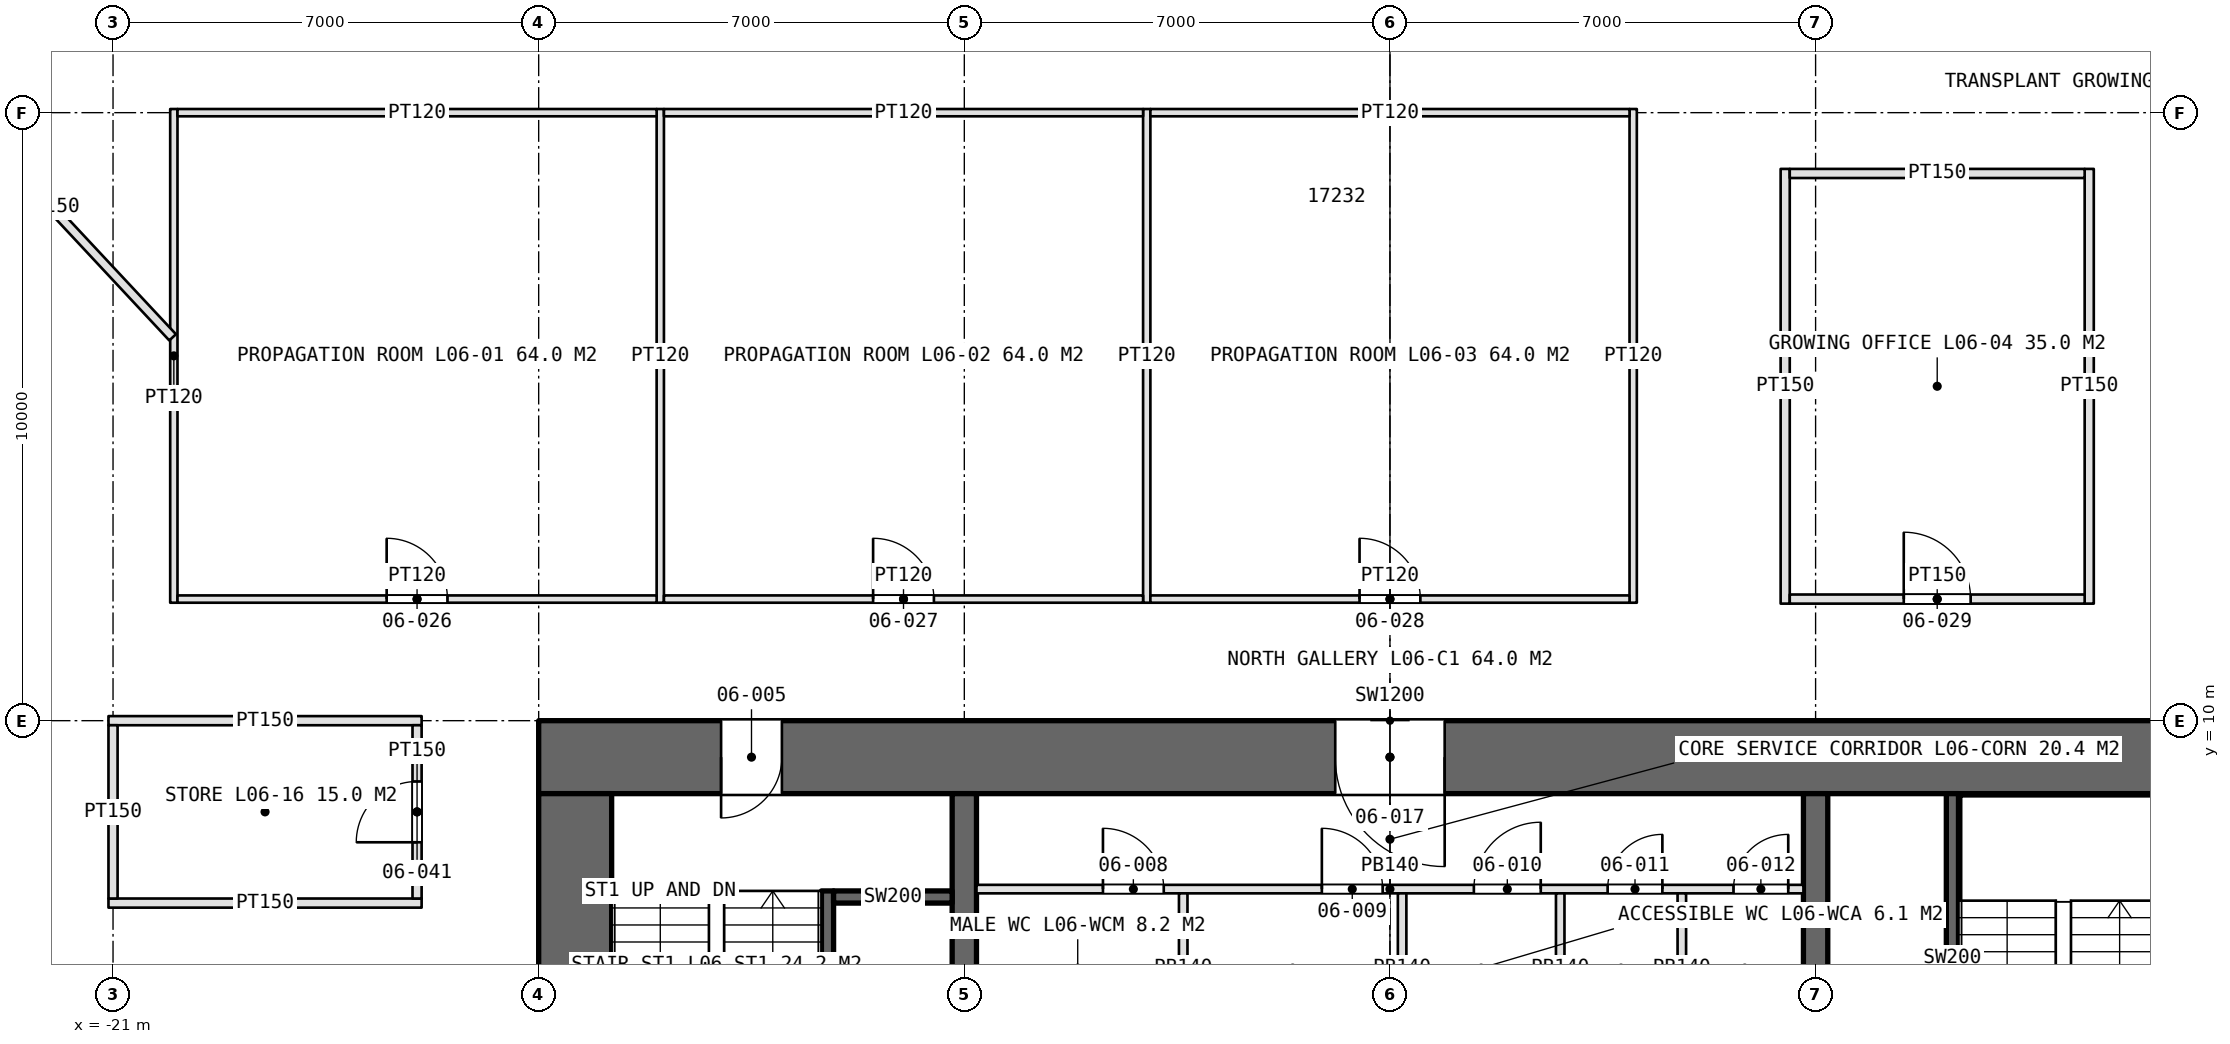
"""IFC4 building model, lengths in metres.
Left out: names, types, materials, properties, quantities, classifications, styles, units other than length and angle.
Written with IfcOpenShell. Run it as: python <this file> out.ifc"""

import sys

from ifc_helpers import new_model, si_unit, direction, frame, frame_2d, origin, place, context, subcontext, project, spatial, rectangle, extrude, element, fill, save


model = new_model("IFC4")
c1 = context("Model", 3, precision=1e-05, world=origin(), true_north=direction((0.0, 1.0)))
c2 = subcontext(c1, "Body", "Model", "MODEL_VIEW")
j1 = project(units=[si_unit("LENGTHUNIT", "METRE"), si_unit("PLANEANGLEUNIT", "RADIAN")], contexts=[c1])
p1 = place(None, origin())
s1 = spatial("IfcSite", under=j1, at=p1, CompositionType="ELEMENT")
p2 = place(p1, origin())
s2 = spatial("IfcBuilding", under=s1, at=p2, CompositionType="ELEMENT")
p3 = place(p2, frame((0.0, 0.0, 30.0)))
s3 = spatial("IfcBuildingStorey", under=s2, at=p3, CompositionType="ELEMENT", Elevation=30.0)
p4 = place(p3, frame((14.0, 9.4, 0.0), z_axis=(0.0, 0.0, 1.0), x_axis=(-1.0, 0.0, 0.0)))
e1 = element("IfcWall", 1, at=p4, inside=s3, PredefinedType="SHEAR", context=c2, shape_type="SweptSolid", body=[
    extrude(rectangle(XDim=28.0, YDim=1.2, at=frame_2d((14.0, 0.0))), origin(), (0.0, 0.0, 1.0), 5.0),
])
p5 = place(p4, frame((24.0, 0.0, 0.0)))
e2 = element("IfcOpeningElement", 2, at=p5, cuts=e1, PredefinedType="OPENING", context=c2, shape_type="SweptSolid", body=[
    extrude(rectangle(XDim=1.0, YDim=2.4, at=frame_2d((0.5, 1.2))), frame((0.0, 0.61, 0.0), z_axis=(0.0, -1.0, 0.0), x_axis=(1.0, 0.0, 0.0)), (0.0, 0.0, 1.0), 1.22),
])
p6 = place(p4, frame((13.1, 0.0, 0.0)))
e3 = element("IfcOpeningElement", 3, at=p6, cuts=e1, PredefinedType="OPENING", context=c2, shape_type="SweptSolid", body=[
    extrude(rectangle(XDim=1.8, YDim=2.4, at=frame_2d((0.9, 1.2))), frame((0.0, 0.61, 0.0), z_axis=(0.0, -1.0, 0.0), x_axis=(1.0, 0.0, 0.0)), (0.0, 0.0, 1.0), 1.22),
])
p7 = place(p3, frame((-13.4, 8.8, 0.0), z_axis=(0.0, 0.0, 1.0), x_axis=(0.0, -1.0, 0.0)))
e4 = element("IfcWall", 4, at=p7, inside=s3, PredefinedType="SHEAR", context=c2, shape_type="SweptSolid", body=[
    extrude(rectangle(XDim=17.6, YDim=1.2, at=frame_2d((8.8, 0.0))), origin(), (0.0, 0.0, 1.0), 5.0),
])
p8 = place(p7, frame((7.9, 0.0, 0.0)))
e5 = element("IfcOpeningElement", 5, at=p8, cuts=e4, PredefinedType="OPENING", context=c2, shape_type="SweptSolid", body=[
    extrude(rectangle(XDim=1.8, YDim=2.4, at=frame_2d((0.9, 1.2))), frame((0.0, 0.61, 0.0), z_axis=(0.0, -1.0, 0.0), x_axis=(1.0, 0.0, 0.0)), (0.0, 0.0, 1.0), 1.22),
])
p9 = place(p7, frame((16.5, 0.0, 0.0)))
e6 = element("IfcOpeningElement", 6, at=p9, cuts=e4, PredefinedType="OPENING", context=c2, shape_type="SweptSolid", body=[
    extrude(rectangle(XDim=1.0, YDim=2.4, at=frame_2d((0.5, 1.2))), frame((0.0, 0.61, 0.0), z_axis=(0.0, -1.0, 0.0), x_axis=(1.0, 0.0, 0.0)), (0.0, 0.0, 1.0), 1.22),
])
p10 = place(p3, frame((-7.0, -8.8, 0.0), z_axis=(0.0, 0.0, 1.0), x_axis=(0.0, 1.0, 0.0)))
e7 = element("IfcWall", 7, at=p10, inside=s3, PredefinedType="SHEAR", context=c2, shape_type="SweptSolid", body=[
    extrude(rectangle(XDim=17.6, YDim=0.4, at=frame_2d((8.8, 0.0))), origin(), (0.0, 0.0, 1.0), 5.0),
])
p11 = place(p10, frame((7.9, 0.0, 0.0)))
e8 = element("IfcOpeningElement", 8, at=p11, cuts=e7, PredefinedType="OPENING", context=c2, shape_type="SweptSolid", body=[
    extrude(rectangle(XDim=1.8, YDim=2.4, at=frame_2d((0.9, 1.2))), frame((0.0, 0.21, 0.0), z_axis=(0.0, -1.0, 0.0), x_axis=(1.0, 0.0, 0.0)), (0.0, 0.0, 1.0), 0.42),
])
p12 = place(p3, frame((7.0, -8.8, 0.0), z_axis=(0.0, 0.0, 1.0), x_axis=(0.0, 1.0, 0.0)))
e9 = element("IfcWall", 9, at=p12, inside=s3, PredefinedType="SHEAR", context=c2, shape_type="SweptSolid", body=[
    extrude(rectangle(XDim=17.6, YDim=0.4, at=frame_2d((8.8, 0.0))), origin(), (0.0, 0.0, 1.0), 5.0),
])
p13 = place(p12, frame((7.9, 0.0, 0.0)))
e10 = element("IfcOpeningElement", 10, at=p13, cuts=e9, PredefinedType="OPENING", context=c2, shape_type="SweptSolid", body=[
    extrude(rectangle(XDim=1.8, YDim=2.4, at=frame_2d((0.9, 1.2))), frame((0.0, 0.21, 0.0), z_axis=(0.0, -1.0, 0.0), x_axis=(1.0, 0.0, 0.0)), (0.0, 0.0, 1.0), 0.42),
])
p14 = place(p3, frame((-6.8, 7.23, 0.0), z_axis=(0.0, 0.0, 1.0), x_axis=(1.0, 0.0, 0.0)))
e11 = element("IfcWall", 11, at=p14, inside=s3, PredefinedType="PARTITIONING", context=c2, shape_type="SweptSolid", body=[
    extrude(rectangle(XDim=13.6, YDim=0.14, at=frame_2d((6.8, 0.0))), origin(), (0.0, 0.0, 1.0), 4.75),
])
p15 = place(p14, frame((2.08, 0.0, 0.0)))
e12 = element("IfcOpeningElement", 12, at=p15, cuts=e11, PredefinedType="OPENING", context=c2, shape_type="SweptSolid", body=[
    extrude(rectangle(XDim=1.0, YDim=2.4, at=frame_2d((0.5, 1.2))), frame((0.0, 0.08, 0.0), z_axis=(0.0, -1.0, 0.0), x_axis=(1.0, 0.0, 0.0)), (0.0, 0.0, 1.0), 0.16),
])
p16 = place(p14, frame((5.68, 0.0, 0.0)))
e13 = element("IfcOpeningElement", 13, at=p16, cuts=e11, PredefinedType="OPENING", context=c2, shape_type="SweptSolid", body=[
    extrude(rectangle(XDim=1.0, YDim=2.4, at=frame_2d((0.5, 1.2))), frame((0.0, 0.08, 0.0), z_axis=(0.0, -1.0, 0.0), x_axis=(1.0, 0.0, 0.0)), (0.0, 0.0, 1.0), 0.16),
])
p17 = place(p14, frame((8.18, 0.0, 0.0)))
e14 = element("IfcOpeningElement", 14, at=p17, cuts=e11, PredefinedType="OPENING", context=c2, shape_type="SweptSolid", body=[
    extrude(rectangle(XDim=1.1, YDim=2.4, at=frame_2d((0.55, 1.2))), frame((0.0, 0.08, 0.0), z_axis=(0.0, -1.0, 0.0), x_axis=(1.0, 0.0, 0.0)), (0.0, 0.0, 1.0), 0.16),
])
p18 = place(p14, frame((10.38, 0.0, 0.0)))
e15 = element("IfcOpeningElement", 15, at=p18, cuts=e11, PredefinedType="OPENING", context=c2, shape_type="SweptSolid", body=[
    extrude(rectangle(XDim=0.9, YDim=2.4, at=frame_2d((0.45, 1.2))), frame((0.0, 0.08, 0.0), z_axis=(0.0, -1.0, 0.0), x_axis=(1.0, 0.0, 0.0)), (0.0, 0.0, 1.0), 0.16),
])
p19 = place(p14, frame((12.45, 0.0, 0.0)))
e16 = element("IfcOpeningElement", 16, at=p19, cuts=e11, PredefinedType="OPENING", context=c2, shape_type="SweptSolid", body=[
    extrude(rectangle(XDim=0.9, YDim=2.4, at=frame_2d((0.45, 1.2))), frame((0.0, 0.08, 0.0), z_axis=(0.0, -1.0, 0.0), x_axis=(1.0, 0.0, 0.0)), (0.0, 0.0, 1.0), 0.16),
])
for number, where, z_axis, x_axis in (
    (17, (-3.4, 4.7, 0.0), (0.0, 0.0, 1.0), (0.0, 1.0, 0.0)),
    (18, (0.2, 4.7, 0.0), (0.0, 0.0, 1.0), (0.0, 1.0, 0.0)),
    (19, (2.8, 4.7, 0.0), (0.0, 0.0, 1.0), (0.0, 1.0, 0.0)),
    (20, (4.8, 4.7, 0.0), (0.0, 0.0, 1.0), (0.0, 1.0, 0.0)),
):
    element("IfcWall", number, at=place(p3, frame(where, z_axis=z_axis, x_axis=x_axis)), inside=s3, PredefinedType="PARTITIONING", context=c2, shape_type="SweptSolid", body=[
        extrude(rectangle(XDim=2.46, YDim=0.14, at=frame_2d((1.23, 0.0))), origin(), (0.0, 0.0, 1.0), 4.75),
    ])
p20 = place(p3, frame((-9.25, 7.2, 0.0), z_axis=(0.0, 0.0, 1.0), x_axis=(0.0, -1.0, 0.0)))
e21 = element("IfcWall", 21, at=p20, inside=s3, PredefinedType="SOLIDWALL", context=c2, shape_type="SweptSolid", body=[
    extrude(rectangle(XDim=5.4, YDim=0.2, at=frame_2d((2.7, 0.0))), origin(), (0.0, 0.0, 1.0), 5.0),
])
p21 = place(p3, frame((-9.15, 7.1, 0.0), z_axis=(0.0, 0.0, 1.0), x_axis=(1.0, 0.0, 0.0)))
e22 = element("IfcWall", 22, at=p21, inside=s3, PredefinedType="SOLIDWALL", context=c2, shape_type="SweptSolid", body=[
    extrude(rectangle(XDim=1.95, YDim=0.2, at=frame_2d((0.975, 0.0))), origin(), (0.0, 0.0, 1.0), 5.0),
])
p22 = place(p3, frame((9.25, 3.4, 0.0), z_axis=(0.0, 0.0, 1.0), x_axis=(0.0, 1.0, 0.0)))
e23 = element("IfcWall", 23, at=p22, inside=s3, PredefinedType="SOLIDWALL", context=c2, shape_type="SweptSolid", body=[
    extrude(rectangle(XDim=5.4, YDim=0.2, at=frame_2d((2.7, 0.0))), origin(), (0.0, 0.0, 1.0), 5.0),
])
for number, where, z_axis, x_axis in (
    (24, (-20.0, 11.94, 0.0), (0.0, 0.0, 1.0), (0.0, 1.0, 0.0)),
    (25, (-12.0, 11.94, 0.0), (0.0, 0.0, 1.0), (0.0, 1.0, 0.0)),
    (26, (-4.0, 11.94, 0.0), (0.0, 0.0, 1.0), (0.0, 1.0, 0.0)),
    (27, (4.0, 11.94, 0.0), (0.0, 0.0, 1.0), (0.0, 1.0, 0.0)),
):
    element("IfcWall", number, at=place(p3, frame(where, z_axis=z_axis, x_axis=x_axis)), inside=s3, PredefinedType="PARTITIONING", context=c2, shape_type="SweptSolid", body=[
        extrude(rectangle(XDim=8.12, YDim=0.12, at=frame_2d((4.06, 0.0))), origin(), (0.0, 0.0, 1.0), 3.6),
    ])
p23 = place(p3, frame((-19.94, 12.0, 0.0), z_axis=(0.0, 0.0, 1.0), x_axis=(1.0, 0.0, 0.0)))
e28 = element("IfcWall", 28, at=p23, inside=s3, PredefinedType="PARTITIONING", context=c2, shape_type="SweptSolid", body=[
    extrude(rectangle(XDim=7.88, YDim=0.12, at=frame_2d((3.94, 0.0))), origin(), (0.0, 0.0, 1.0), 3.6),
])
p24 = place(p23, frame((3.44, 0.0, 0.0)))
e29 = element("IfcOpeningElement", 29, at=p24, cuts=e28, PredefinedType="OPENING", context=c2, shape_type="SweptSolid", body=[
    extrude(rectangle(XDim=1.0, YDim=2.2, at=frame_2d((0.5, 1.1))), frame((0.0, 0.07, 0.0), z_axis=(0.0, -1.0, 0.0), x_axis=(1.0, 0.0, 0.0)), (0.0, 0.0, 1.0), 0.14),
])
p25 = place(p3, frame((-19.94, 20.0, 0.0), z_axis=(0.0, 0.0, 1.0), x_axis=(1.0, 0.0, 0.0)))
e30 = element("IfcWall", 30, at=p25, inside=s3, PredefinedType="PARTITIONING", context=c2, shape_type="SweptSolid", body=[
    extrude(rectangle(XDim=7.88, YDim=0.12, at=frame_2d((3.94, 0.0))), origin(), (0.0, 0.0, 1.0), 3.6),
])
p26 = place(p3, frame((-11.94, 12.0, 0.0), z_axis=(0.0, 0.0, 1.0), x_axis=(1.0, 0.0, 0.0)))
e31 = element("IfcWall", 31, at=p26, inside=s3, PredefinedType="PARTITIONING", context=c2, shape_type="SweptSolid", body=[
    extrude(rectangle(XDim=7.88, YDim=0.12, at=frame_2d((3.94, 0.0))), origin(), (0.0, 0.0, 1.0), 3.6),
])
p27 = place(p26, frame((3.44, 0.0, 0.0)))
e32 = element("IfcOpeningElement", 32, at=p27, cuts=e31, PredefinedType="OPENING", context=c2, shape_type="SweptSolid", body=[
    extrude(rectangle(XDim=1.0, YDim=2.2, at=frame_2d((0.5, 1.1))), frame((0.0, 0.07, 0.0), z_axis=(0.0, -1.0, 0.0), x_axis=(1.0, 0.0, 0.0)), (0.0, 0.0, 1.0), 0.14),
])
p28 = place(p3, frame((-11.94, 20.0, 0.0), z_axis=(0.0, 0.0, 1.0), x_axis=(1.0, 0.0, 0.0)))
e33 = element("IfcWall", 33, at=p28, inside=s3, PredefinedType="PARTITIONING", context=c2, shape_type="SweptSolid", body=[
    extrude(rectangle(XDim=7.88, YDim=0.12, at=frame_2d((3.94, 0.0))), origin(), (0.0, 0.0, 1.0), 3.6),
])
p29 = place(p3, frame((-3.94, 12.0, 0.0), z_axis=(0.0, 0.0, 1.0), x_axis=(1.0, 0.0, 0.0)))
e34 = element("IfcWall", 34, at=p29, inside=s3, PredefinedType="PARTITIONING", context=c2, shape_type="SweptSolid", body=[
    extrude(rectangle(XDim=7.88, YDim=0.12, at=frame_2d((3.94, 0.0))), origin(), (0.0, 0.0, 1.0), 3.6),
])
p30 = place(p29, frame((3.44, 0.0, 0.0)))
e35 = element("IfcOpeningElement", 35, at=p30, cuts=e34, PredefinedType="OPENING", context=c2, shape_type="SweptSolid", body=[
    extrude(rectangle(XDim=1.0, YDim=2.2, at=frame_2d((0.5, 1.1))), frame((0.0, 0.07, 0.0), z_axis=(0.0, -1.0, 0.0), x_axis=(1.0, 0.0, 0.0)), (0.0, 0.0, 1.0), 0.14),
])
p31 = place(p3, frame((-3.94, 20.0, 0.0), z_axis=(0.0, 0.0, 1.0), x_axis=(1.0, 0.0, 0.0)))
e36 = element("IfcWall", 36, at=p31, inside=s3, PredefinedType="PARTITIONING", context=c2, shape_type="SweptSolid", body=[
    extrude(rectangle(XDim=7.88, YDim=0.12, at=frame_2d((3.94, 0.0))), origin(), (0.0, 0.0, 1.0), 3.6),
])
for number, where, z_axis, x_axis in (
    (37, (6.5, 11.925, 0.0), (0.0, 0.0, 1.0), (0.0, 1.0, 0.0)),
    (38, (11.5, 11.925, 0.0), (0.0, 0.0, 1.0), (0.0, 1.0, 0.0)),
):
    element("IfcWall", number, at=place(p3, frame(where, z_axis=z_axis, x_axis=x_axis)), inside=s3, PredefinedType="PARTITIONING", context=c2, shape_type="SweptSolid", body=[
        extrude(rectangle(XDim=7.15, YDim=0.15, at=frame_2d((3.575, 0.0))), origin(), (0.0, 0.0, 1.0), 3.6),
    ])
p32 = place(p3, frame((6.575, 12.0, 0.0), z_axis=(0.0, 0.0, 1.0), x_axis=(1.0, 0.0, 0.0)))
e39 = element("IfcWall", 39, at=p32, inside=s3, PredefinedType="PARTITIONING", context=c2, shape_type="SweptSolid", body=[
    extrude(rectangle(XDim=4.85, YDim=0.15, at=frame_2d((2.425, 0.0))), origin(), (0.0, 0.0, 1.0), 3.6),
])
p33 = place(p32, frame((1.875, 0.0, 0.0)))
e40 = element("IfcOpeningElement", 40, at=p33, cuts=e39, PredefinedType="OPENING", context=c2, shape_type="SweptSolid", body=[
    extrude(rectangle(XDim=1.1, YDim=2.3, at=frame_2d((0.55, 1.15))), frame((0.0, 0.085, 0.0), z_axis=(0.0, -1.0, 0.0), x_axis=(1.0, 0.0, 0.0)), (0.0, 0.0, 1.0), 0.17),
])
p34 = place(p3, frame((6.575, 19.0, 0.0), z_axis=(0.0, 0.0, 1.0), x_axis=(1.0, 0.0, 0.0)))
e41 = element("IfcWall", 41, at=p34, inside=s3, PredefinedType="PARTITIONING", context=c2, shape_type="SweptSolid", body=[
    extrude(rectangle(XDim=4.85, YDim=0.15, at=frame_2d((2.425, 0.0))), origin(), (0.0, 0.0, 1.0), 3.6),
])
for number, where, z_axis, x_axis in (
    (42, (-15.925, 7.0, 0.0), (0.0, 0.0, 1.0), (-1.0, 0.0, 0.0)),
    (43, (-15.925, 10.0, 0.0), (0.0, 0.0, 1.0), (-1.0, 0.0, 0.0)),
):
    element("IfcWall", number, at=place(p3, frame(where, z_axis=z_axis, x_axis=x_axis)), inside=s3, PredefinedType="PARTITIONING", context=c2, shape_type="SweptSolid", body=[
        extrude(rectangle(XDim=5.15, YDim=0.15, at=frame_2d((2.575, 0.0))), origin(), (0.0, 0.0, 1.0), 3.6),
    ])
p35 = place(p3, frame((-16.0, 7.075, 0.0), z_axis=(0.0, 0.0, 1.0), x_axis=(0.0, 1.0, 0.0)))
e44 = element("IfcWall", 44, at=p35, inside=s3, PredefinedType="PARTITIONING", context=c2, shape_type="SweptSolid", body=[
    extrude(rectangle(XDim=2.85, YDim=0.15, at=frame_2d((1.425, 0.0))), origin(), (0.0, 0.0, 1.0), 3.6),
])
p36 = place(p35, frame((0.925, 0.0, 0.0)))
e45 = element("IfcOpeningElement", 45, at=p36, cuts=e44, PredefinedType="OPENING", context=c2, shape_type="SweptSolid", body=[
    extrude(rectangle(XDim=1.0, YDim=2.2, at=frame_2d((0.5, 1.1))), frame((0.0, 0.085, 0.0), z_axis=(0.0, -1.0, 0.0), x_axis=(1.0, 0.0, 0.0)), (0.0, 0.0, 1.0), 0.17),
])
p37 = place(p3, frame((-21.0, 7.075, 0.0), z_axis=(0.0, 0.0, 1.0), x_axis=(0.0, 1.0, 0.0)))
e46 = element("IfcWall", 46, at=p37, inside=s3, PredefinedType="PARTITIONING", context=c2, shape_type="SweptSolid", body=[
    extrude(rectangle(XDim=2.85, YDim=0.15, at=frame_2d((1.425, 0.0))), origin(), (0.0, 0.0, 1.0), 3.6),
])
p38 = place(p3, frame((-20.02, 16.305, 0.0), z_axis=(0.0, 0.0, 1.0), x_axis=(-0.682516386928, 0.730870290527, 0.0)))
e47 = element("IfcWall", 47, at=p38, inside=s3, PredefinedType="PARTITIONING", context=c2, shape_type="SweptSolid", body=[
    extrude(rectangle(XDim=5.882, YDim=0.15, at=frame_2d((2.941, 0.0))), origin(), (0.0, 0.0, 1.0), 3.6),
])
p39 = place(p5, origin())
e48 = element("IfcDoor", 48, at=p39, inside=s3, OperationType="SINGLE_SWING_RIGHT", PredefinedType="DOOR", context=c2, shape_type="SweptSolid", body=[
    extrude(rectangle(XDim=1.0, YDim=2.4, at=frame_2d((0.5, 1.2))), frame((0.0, 0.025, 0.0), z_axis=(0.0, -1.0, 0.0), x_axis=(1.0, 0.0, 0.0)), (0.0, 0.0, 1.0), 0.05),
])
fill(e2, e48)
p40 = place(p15, origin())
e49 = element("IfcDoor", 49, at=p40, inside=s3, OperationType="SINGLE_SWING_LEFT", PredefinedType="DOOR", context=c2, shape_type="SweptSolid", body=[
    extrude(rectangle(XDim=1.0, YDim=2.4, at=frame_2d((0.5, 1.2))), frame((0.0, 0.025, 0.0), z_axis=(0.0, -1.0, 0.0), x_axis=(1.0, 0.0, 0.0)), (0.0, 0.0, 1.0), 0.05),
])
fill(e12, e49)
p41 = place(p16, origin())
e50 = element("IfcDoor", 50, at=p41, inside=s3, OperationType="SINGLE_SWING_LEFT", PredefinedType="DOOR", context=c2, shape_type="SweptSolid", body=[
    extrude(rectangle(XDim=1.0, YDim=2.4, at=frame_2d((0.5, 1.2))), frame((0.0, 0.025, 0.0), z_axis=(0.0, -1.0, 0.0), x_axis=(1.0, 0.0, 0.0)), (0.0, 0.0, 1.0), 0.05),
])
fill(e13, e50)
p42 = place(p17, origin())
e51 = element("IfcDoor", 51, at=p42, inside=s3, OperationType="SINGLE_SWING_RIGHT", PredefinedType="DOOR", context=c2, shape_type="SweptSolid", body=[
    extrude(rectangle(XDim=1.1, YDim=2.4, at=frame_2d((0.55, 1.2))), frame((0.0, 0.025, 0.0), z_axis=(0.0, -1.0, 0.0), x_axis=(1.0, 0.0, 0.0)), (0.0, 0.0, 1.0), 0.05),
])
fill(e14, e51)
p43 = place(p18, origin())
e52 = element("IfcDoor", 52, at=p43, inside=s3, OperationType="SINGLE_SWING_RIGHT", PredefinedType="DOOR", context=c2, shape_type="SweptSolid", body=[
    extrude(rectangle(XDim=0.9, YDim=2.4, at=frame_2d((0.45, 1.2))), frame((0.0, 0.025, 0.0), z_axis=(0.0, -1.0, 0.0), x_axis=(1.0, 0.0, 0.0)), (0.0, 0.0, 1.0), 0.05),
])
fill(e15, e52)
p44 = place(p19, origin())
e53 = element("IfcDoor", 53, at=p44, inside=s3, OperationType="SINGLE_SWING_RIGHT", PredefinedType="DOOR", context=c2, shape_type="SweptSolid", body=[
    extrude(rectangle(XDim=0.9, YDim=2.4, at=frame_2d((0.45, 1.2))), frame((0.0, 0.025, 0.0), z_axis=(0.0, -1.0, 0.0), x_axis=(1.0, 0.0, 0.0)), (0.0, 0.0, 1.0), 0.05),
])
fill(e16, e53)
p45 = place(p6, origin())
e54 = element("IfcDoor", 54, at=p45, inside=s3, OperationType="DOUBLE_DOOR_SINGLE_SWING", PredefinedType="DOOR", context=c2, shape_type="SweptSolid", body=[
    extrude(rectangle(XDim=1.8, YDim=2.4, at=frame_2d((0.9, 1.2))), frame((0.0, 0.025, 0.0), z_axis=(0.0, -1.0, 0.0), x_axis=(1.0, 0.0, 0.0)), (0.0, 0.0, 1.0), 0.05),
])
fill(e3, e54)
p46 = place(p24, origin())
e55 = element("IfcDoor", 55, at=p46, inside=s3, OperationType="SINGLE_SWING_LEFT", PredefinedType="DOOR", context=c2, shape_type="SweptSolid", body=[
    extrude(rectangle(XDim=1.0, YDim=2.2, at=frame_2d((0.5, 1.1))), frame((0.0, 0.025, 0.0), z_axis=(0.0, -1.0, 0.0), x_axis=(1.0, 0.0, 0.0)), (0.0, 0.0, 1.0), 0.05),
])
fill(e29, e55)
p47 = place(p27, origin())
e56 = element("IfcDoor", 56, at=p47, inside=s3, OperationType="SINGLE_SWING_LEFT", PredefinedType="DOOR", context=c2, shape_type="SweptSolid", body=[
    extrude(rectangle(XDim=1.0, YDim=2.2, at=frame_2d((0.5, 1.1))), frame((0.0, 0.025, 0.0), z_axis=(0.0, -1.0, 0.0), x_axis=(1.0, 0.0, 0.0)), (0.0, 0.0, 1.0), 0.05),
])
fill(e32, e56)
p48 = place(p30, origin())
e57 = element("IfcDoor", 57, at=p48, inside=s3, OperationType="SINGLE_SWING_LEFT", PredefinedType="DOOR", context=c2, shape_type="SweptSolid", body=[
    extrude(rectangle(XDim=1.0, YDim=2.2, at=frame_2d((0.5, 1.1))), frame((0.0, 0.025, 0.0), z_axis=(0.0, -1.0, 0.0), x_axis=(1.0, 0.0, 0.0)), (0.0, 0.0, 1.0), 0.05),
])
fill(e35, e57)
p49 = place(p33, origin())
e58 = element("IfcDoor", 58, at=p49, inside=s3, OperationType="SINGLE_SWING_LEFT", PredefinedType="DOOR", context=c2, shape_type="SweptSolid", body=[
    extrude(rectangle(XDim=1.1, YDim=2.3, at=frame_2d((0.55, 1.15))), frame((0.0, 0.025, 0.0), z_axis=(0.0, -1.0, 0.0), x_axis=(1.0, 0.0, 0.0)), (0.0, 0.0, 1.0), 0.05),
])
fill(e40, e58)
p50 = place(p36, origin())
e59 = element("IfcDoor", 59, at=p50, inside=s3, OperationType="SINGLE_SWING_LEFT", PredefinedType="DOOR", context=c2, shape_type="SweptSolid", body=[
    extrude(rectangle(XDim=1.0, YDim=2.2, at=frame_2d((0.5, 1.1))), frame((0.0, 0.025, 0.0), z_axis=(0.0, -1.0, 0.0), x_axis=(1.0, 0.0, 0.0)), (0.0, 0.0, 1.0), 0.05),
])
fill(e45, e59)
save(model, sys.argv[1])
